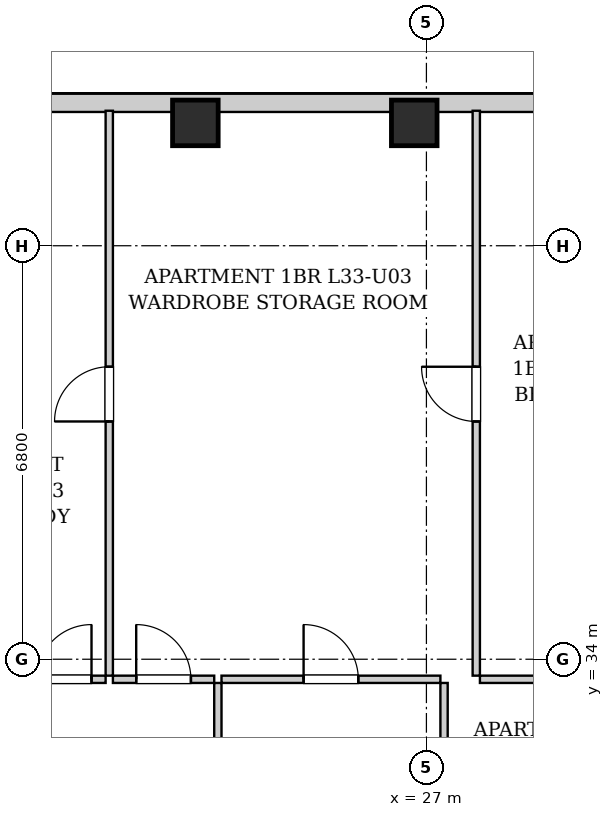
"""IFC4 building model, lengths in metres.
Left out: names, types, materials, properties, quantities, classifications, styles, units other than length and angle.
Written with IfcOpenShell. Run it as: python <this file> out.ifc"""

import sys

from ifc_helpers import new_model, si_unit, direction, frame, frame_2d, origin, origin_2d, place, context, subcontext, project, spatial, rectangle, extrude, element, fill, save


model = new_model("IFC4")
c1 = context("Model", 3, precision=1e-05, world=origin(), true_north=direction((0.0, 1.0)))
c2 = subcontext(c1, "Body", "Model", "MODEL_VIEW")
j1 = project(units=[si_unit("LENGTHUNIT", "METRE"), si_unit("PLANEANGLEUNIT", "RADIAN")], contexts=[c1])
p1 = place(None, origin())
s1 = spatial("IfcSite", under=j1, at=p1, CompositionType="ELEMENT")
p2 = place(p1, origin())
s2 = spatial("IfcBuilding", under=s1, at=p2, CompositionType="ELEMENT")
p3 = place(p2, frame((0.0, 0.0, 116.7)))
s3 = spatial("IfcBuildingStorey", under=s2, at=p3, CompositionType="ELEMENT", Elevation=116.7)
for number, where, z_axis, x_axis in (
    (1, (23.2, 42.82, 0.0), (0.0, 0.0, 1.0), (1.0, 0.0, 0.0)),
    (2, (26.8, 42.82, 0.0), (0.0, 0.0, 1.0), (1.0, 0.0, 0.0)),
):
    element("IfcColumn", number, at=place(p3, frame(where, z_axis=z_axis, x_axis=x_axis)), inside=s3, PredefinedType="COLUMN", context=c2, shape_type="SweptSolid", body=[
        extrude(rectangle(XDim=0.75, YDim=0.75, at=origin_2d()), origin(), (0.0, 0.0, 1.0), 3.2),
    ])
p4 = place(p3, frame((10.0, 43.15, 0.0), z_axis=(0.0, 0.0, 1.0), x_axis=(1.0, 0.0, 0.0)))
e3 = element("IfcWall", 3, at=p4, inside=s3, PredefinedType="SOLIDWALL", context=c2, shape_type="SweptSolid", body=[
    extrude(rectangle(XDim=21.95, YDim=0.3, at=frame_2d((10.975, 0.0))), origin(), (0.0, 0.0, 1.0), 2.88),
])
p5 = place(p4, frame((5.489, 0.0, 0.55)))
e4 = element("IfcOpeningElement", 4, at=p5, cuts=e3, PredefinedType="OPENING", context=c2, shape_type="SweptSolid", body=[
    extrude(rectangle(XDim=1.35, YDim=1.2, at=frame_2d((0.675, 0.6))), frame((0.0, 0.16, 0.0), z_axis=(0.0, -1.0, 0.0), x_axis=(1.0, 0.0, 0.0)), (0.0, 0.0, 1.0), 0.32),
])
p6 = place(p4, frame((9.322, 0.0, 0.55)))
e5 = element("IfcOpeningElement", 5, at=p6, cuts=e3, PredefinedType="OPENING", context=c2, shape_type="SweptSolid", body=[
    extrude(rectangle(XDim=1.35, YDim=1.2, at=frame_2d((0.675, 0.6))), frame((0.0, 0.16, 0.0), z_axis=(0.0, -1.0, 0.0), x_axis=(1.0, 0.0, 0.0)), (0.0, 0.0, 1.0), 0.32),
])
p7 = place(p4, frame((18.869, 0.0, 0.55)))
e6 = element("IfcOpeningElement", 6, at=p7, cuts=e3, PredefinedType="OPENING", context=c2, shape_type="SweptSolid", body=[
    extrude(rectangle(XDim=1.35, YDim=1.2, at=frame_2d((0.675, 0.6))), frame((0.0, 0.16, 0.0), z_axis=(0.0, -1.0, 0.0), x_axis=(1.0, 0.0, 0.0)), (0.0, 0.0, 1.0), 0.32),
])
p8 = place(p3, frame((23.57, 30.76, 0.0), z_axis=(0.0, 0.0, 1.0), x_axis=(0.0, 1.0, 0.0)))
e7 = element("IfcWall", 7, at=p8, inside=s3, PredefinedType="PARTITIONING", context=c2, shape_type="SweptSolid", body=[
    extrude(rectangle(XDim=2.85, YDim=0.12, at=frame_2d((1.425, 0.0))), origin(), (0.0, 0.0, 1.0), 2.88),
])
p9 = place(p8, frame((0.975, 0.0, 0.0)))
e8 = element("IfcOpeningElement", 8, at=p9, cuts=e7, PredefinedType="OPENING", context=c2, shape_type="SweptSolid", body=[
    extrude(rectangle(XDim=0.9, YDim=2.05, at=frame_2d((0.45, 1.025))), frame((0.0, 0.07, 0.0), z_axis=(0.0, -1.0, 0.0), x_axis=(1.0, 0.0, 0.0)), (0.0, 0.0, 1.0), 0.14),
])
p10 = place(p3, frame((20.36, 33.67, 0.0), z_axis=(0.0, 0.0, 1.0), x_axis=(1.0, 0.0, 0.0)))
e9 = element("IfcWall", 9, at=p10, inside=s3, PredefinedType="PARTITIONING", context=c2, shape_type="SweptSolid", body=[
    extrude(rectangle(XDim=1.364, YDim=0.12, at=frame_2d((0.682, 0.0))), origin(), (0.0, 0.0, 1.0), 2.88),
])
p11 = place(p10, frame((0.232, 0.0, 0.0)))
e10 = element("IfcOpeningElement", 10, at=p11, cuts=e9, PredefinedType="OPENING", context=c2, shape_type="SweptSolid", body=[
    extrude(rectangle(XDim=0.9, YDim=2.05, at=frame_2d((0.45, 1.025))), frame((0.0, 0.07, 0.0), z_axis=(0.0, -1.0, 0.0), x_axis=(1.0, 0.0, 0.0)), (0.0, 0.0, 1.0), 0.14),
])
p12 = place(p3, frame((21.844, 33.67, 0.0), z_axis=(0.0, 0.0, 1.0), x_axis=(1.0, 0.0, 0.0)))
e11 = element("IfcWall", 11, at=p12, inside=s3, PredefinedType="PARTITIONING", context=c2, shape_type="SweptSolid", body=[
    extrude(rectangle(XDim=1.666, YDim=0.12, at=frame_2d((0.833, 0.0))), origin(), (0.0, 0.0, 1.0), 2.88),
])
p13 = place(p12, frame((0.383, 0.0, 0.0)))
e12 = element("IfcOpeningElement", 12, at=p13, cuts=e11, PredefinedType="OPENING", context=c2, shape_type="SweptSolid", body=[
    extrude(rectangle(XDim=0.9, YDim=2.05, at=frame_2d((0.45, 1.025))), frame((0.0, 0.07, 0.0), z_axis=(0.0, -1.0, 0.0), x_axis=(1.0, 0.0, 0.0)), (0.0, 0.0, 1.0), 0.14),
])
p14 = place(p3, frame((27.29, 30.76, 0.0), z_axis=(0.0, 0.0, 1.0), x_axis=(0.0, 1.0, 0.0)))
e13 = element("IfcWall", 13, at=p14, inside=s3, PredefinedType="PARTITIONING", context=c2, shape_type="SweptSolid", body=[
    extrude(rectangle(XDim=2.85, YDim=0.12, at=frame_2d((1.425, 0.0))), origin(), (0.0, 0.0, 1.0), 2.88),
])
p15 = place(p14, frame((0.975, 0.0, 0.0)))
e14 = element("IfcOpeningElement", 14, at=p15, cuts=e13, PredefinedType="OPENING", context=c2, shape_type="SweptSolid", body=[
    extrude(rectangle(XDim=0.9, YDim=2.05, at=frame_2d((0.45, 1.025))), frame((0.0, 0.07, 0.0), z_axis=(0.0, -1.0, 0.0), x_axis=(1.0, 0.0, 0.0)), (0.0, 0.0, 1.0), 0.14),
])
p16 = place(p3, frame((23.63, 33.67, 0.0), z_axis=(0.0, 0.0, 1.0), x_axis=(1.0, 0.0, 0.0)))
e15 = element("IfcWall", 15, at=p16, inside=s3, PredefinedType="PARTITIONING", context=c2, shape_type="SweptSolid", body=[
    extrude(rectangle(XDim=3.6, YDim=0.12, at=frame_2d((1.8, 0.0))), origin(), (0.0, 0.0, 1.0), 2.88),
])
p17 = place(p16, frame((1.35, 0.0, 0.0)))
e16 = element("IfcOpeningElement", 16, at=p17, cuts=e15, PredefinedType="OPENING", context=c2, shape_type="SweptSolid", body=[
    extrude(rectangle(XDim=0.9, YDim=2.05, at=frame_2d((0.45, 1.025))), frame((0.0, 0.07, 0.0), z_axis=(0.0, -1.0, 0.0), x_axis=(1.0, 0.0, 0.0)), (0.0, 0.0, 1.0), 0.14),
])
p18 = place(p3, frame((27.88, 33.67, 0.0), z_axis=(0.0, 0.0, 1.0), x_axis=(1.0, 0.0, 0.0)))
e17 = element("IfcWall", 17, at=p18, inside=s3, PredefinedType="PARTITIONING", context=c2, shape_type="SweptSolid", body=[
    extrude(rectangle(XDim=3.24, YDim=0.12, at=frame_2d((1.62, 0.0))), origin(), (0.0, 0.0, 1.0), 2.88),
])
p19 = place(p18, frame((1.17, 0.0, 0.0)))
e18 = element("IfcOpeningElement", 18, at=p19, cuts=e17, PredefinedType="OPENING", context=c2, shape_type="SweptSolid", body=[
    extrude(rectangle(XDim=0.9, YDim=2.05, at=frame_2d((0.45, 1.025))), frame((0.0, 0.07, 0.0), z_axis=(0.0, -1.0, 0.0), x_axis=(1.0, 0.0, 0.0)), (0.0, 0.0, 1.0), 0.14),
])
p20 = place(p3, frame((21.784, 33.73, 0.0), z_axis=(0.0, 0.0, 1.0), x_axis=(0.0, 1.0, 0.0)))
e19 = element("IfcWall", 19, at=p20, inside=s3, PredefinedType="PARTITIONING", context=c2, shape_type="SweptSolid", body=[
    extrude(rectangle(XDim=9.29, YDim=0.12, at=frame_2d((4.645, 0.0))), origin(), (0.0, 0.0, 1.0), 2.88),
])
p21 = place(p20, frame((4.18, 0.0, 0.0)))
e20 = element("IfcOpeningElement", 20, at=p21, cuts=e19, PredefinedType="OPENING", context=c2, shape_type="SweptSolid", body=[
    extrude(rectangle(XDim=0.9, YDim=2.05, at=frame_2d((0.45, 1.025))), frame((0.0, 0.07, 0.0), z_axis=(0.0, -1.0, 0.0), x_axis=(1.0, 0.0, 0.0)), (0.0, 0.0, 1.0), 0.14),
])
p22 = place(p3, frame((27.82, 33.73, 0.0), z_axis=(0.0, 0.0, 1.0), x_axis=(0.0, 1.0, 0.0)))
e21 = element("IfcWall", 21, at=p22, inside=s3, PredefinedType="PARTITIONING", context=c2, shape_type="SweptSolid", body=[
    extrude(rectangle(XDim=9.29, YDim=0.12, at=frame_2d((4.645, 0.0))), origin(), (0.0, 0.0, 1.0), 2.88),
])
p23 = place(p22, frame((4.18, 0.0, 0.0)))
e22 = element("IfcOpeningElement", 22, at=p23, cuts=e21, PredefinedType="OPENING", context=c2, shape_type="SweptSolid", body=[
    extrude(rectangle(XDim=0.9, YDim=2.05, at=frame_2d((0.45, 1.025))), frame((0.0, 0.07, 0.0), z_axis=(0.0, -1.0, 0.0), x_axis=(1.0, 0.0, 0.0)), (0.0, 0.0, 1.0), 0.14),
])
p24 = place(p11, origin())
e23 = element("IfcDoor", 23, at=p24, inside=s3, OperationType="SINGLE_SWING_RIGHT", PredefinedType="DOOR", context=c2, shape_type="SweptSolid", body=[
    extrude(rectangle(XDim=0.9, YDim=2.05, at=frame_2d((0.45, 1.025))), frame((0.0, 0.025, 0.0), z_axis=(0.0, -1.0, 0.0), x_axis=(1.0, 0.0, 0.0)), (0.0, 0.0, 1.0), 0.05),
])
fill(e10, e23)
p25 = place(p13, origin())
e24 = element("IfcDoor", 24, at=p25, inside=s3, OperationType="SINGLE_SWING_LEFT", PredefinedType="DOOR", context=c2, shape_type="SweptSolid", body=[
    extrude(rectangle(XDim=0.9, YDim=2.05, at=frame_2d((0.45, 1.025))), frame((0.0, 0.025, 0.0), z_axis=(0.0, -1.0, 0.0), x_axis=(1.0, 0.0, 0.0)), (0.0, 0.0, 1.0), 0.05),
])
fill(e12, e24)
p26 = place(p17, origin())
e25 = element("IfcDoor", 25, at=p26, inside=s3, OperationType="SINGLE_SWING_LEFT", PredefinedType="DOOR", context=c2, shape_type="SweptSolid", body=[
    extrude(rectangle(XDim=0.9, YDim=2.05, at=frame_2d((0.45, 1.025))), frame((0.0, 0.025, 0.0), z_axis=(0.0, -1.0, 0.0), x_axis=(1.0, 0.0, 0.0)), (0.0, 0.0, 1.0), 0.05),
])
fill(e16, e25)
p27 = place(p21, origin())
e26 = element("IfcDoor", 26, at=p27, inside=s3, OperationType="SINGLE_SWING_LEFT", PredefinedType="DOOR", context=c2, shape_type="SweptSolid", body=[
    extrude(rectangle(XDim=0.9, YDim=2.05, at=frame_2d((0.45, 1.025))), frame((0.0, 0.025, 0.0), z_axis=(0.0, -1.0, 0.0), x_axis=(1.0, 0.0, 0.0)), (0.0, 0.0, 1.0), 0.05),
])
fill(e20, e26)
p28 = place(p23, origin())
e27 = element("IfcDoor", 27, at=p28, inside=s3, OperationType="SINGLE_SWING_RIGHT", PredefinedType="DOOR", context=c2, shape_type="SweptSolid", body=[
    extrude(rectangle(XDim=0.9, YDim=2.05, at=frame_2d((0.45, 1.025))), frame((0.0, 0.025, 0.0), z_axis=(0.0, -1.0, 0.0), x_axis=(1.0, 0.0, 0.0)), (0.0, 0.0, 1.0), 0.05),
])
fill(e22, e27)
save(model, sys.argv[1])
